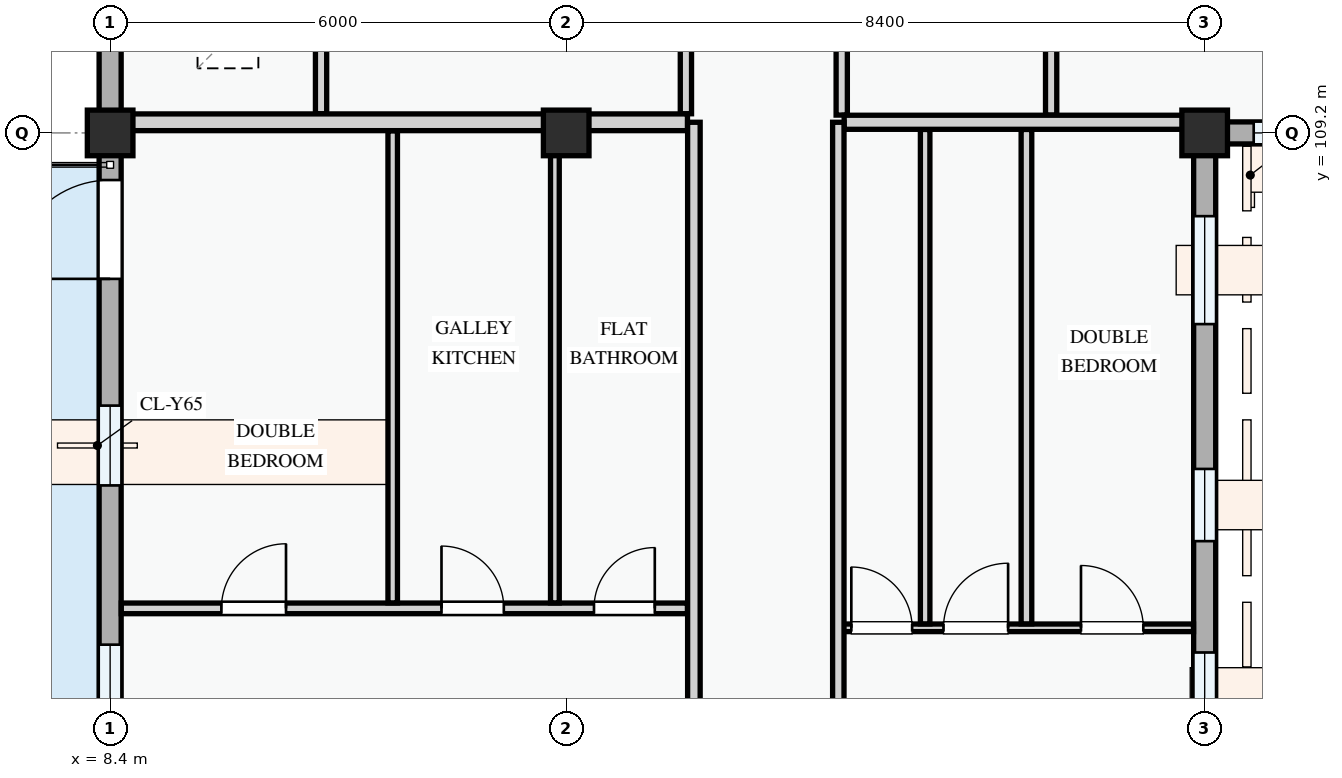
"""IFC4 building model, lengths in metres.
Left out: names, types, materials, properties, quantities, classifications, styles, units other than length and angle.
Written with IfcOpenShell. Run it as: python <this file> out.ifc"""

import sys

from ifc_helpers import new_model, si_unit, direction, frame, frame_2d, origin, origin_2d, place, context, subcontext, project, spatial, rectangle, extrude, element, fill, save


model = new_model("IFC4")
c1 = context("Model", 3, precision=1e-05, world=origin(), true_north=direction((0.0, 1.0)))
c2 = subcontext(c1, "Body", "Model", "MODEL_VIEW")
j1 = project(units=[si_unit("LENGTHUNIT", "METRE"), si_unit("PLANEANGLEUNIT", "RADIAN")], contexts=[c1])
p1 = place(None, origin())
s1 = spatial("IfcSite", under=j1, at=p1, CompositionType="ELEMENT")
p2 = place(p1, origin())
s2 = spatial("IfcBuilding", under=s1, at=p2, CompositionType="ELEMENT")
p3 = place(p2, frame((0.0, 0.0, 27.9)))
s3 = spatial("IfcBuildingStorey", under=s2, at=p3, CompositionType="ELEMENT", Elevation=27.9)
for number, where, z_axis, x_axis in (
    (1, (8.4, 109.2, 0.0), (0.0, 0.0, 1.0), (1.0, 0.0, 0.0)),
    (2, (14.4, 109.2, 0.0), (0.0, 0.0, 1.0), (1.0, 0.0, 0.0)),
    (3, (22.8, 109.2, 0.0), (0.0, 0.0, 1.0), (1.0, 0.0, 0.0)),
):
    element("IfcColumn", number, at=place(p3, frame(where, z_axis=z_axis, x_axis=x_axis)), inside=s3, PredefinedType="COLUMN", context=c2, shape_type="SweptSolid", body=[
        extrude(rectangle(XDim=0.6, YDim=0.6, at=origin_2d()), origin(), (0.0, 0.0, 1.0), 3.3),
    ])
p4 = place(p3, frame((22.8, 109.2, 0.0), z_axis=(0.0, 0.0, 1.0), x_axis=(1.0, 0.0, 0.0)))
e4 = element("IfcWall", 4, at=p4, inside=s3, PredefinedType="STANDARD", context=c2, shape_type="SweptSolid", body=[
    extrude(rectangle(XDim=6.0, YDim=0.29, at=frame_2d((3.0, 0.0))), origin(), (0.0, 0.0, 1.0), 2.475),
])
p5 = place(p4, frame((0.645, 0.0, 0.78)))
e5 = element("IfcOpeningElement", 5, at=p5, cuts=e4, PredefinedType="OPENING", context=c2, shape_type="SweptSolid", body=[
    extrude(rectangle(XDim=1.25, YDim=1.45, at=frame_2d((0.625, 0.725))), frame((0.0, 0.155, 0.0), z_axis=(0.0, -1.0, 0.0), x_axis=(1.0, 0.0, 0.0)), (0.0, 0.0, 1.0), 0.31),
])
p6 = place(p4, frame((2.905, 0.0, 0.78)))
e6 = element("IfcOpeningElement", 6, at=p6, cuts=e4, PredefinedType="OPENING", context=c2, shape_type="SweptSolid", body=[
    extrude(rectangle(XDim=2.35, YDim=1.55, at=frame_2d((1.175, 0.775))), frame((0.0, 0.155, 0.0), z_axis=(0.0, -1.0, 0.0), x_axis=(1.0, 0.0, 0.0)), (0.0, 0.0, 1.0), 0.31),
])
p7 = place(p3, frame((8.4, 115.2, 0.0), z_axis=(0.0, 0.0, 1.0), x_axis=(0.0, -1.0, 0.0)))
e7 = element("IfcWall", 7, at=p7, inside=s3, PredefinedType="STANDARD", context=c2, shape_type="SweptSolid", body=[
    extrude(rectangle(XDim=6.0, YDim=0.29, at=frame_2d((3.0, 0.0))), origin(), (0.0, 0.0, 1.0), 2.445),
])
p8 = place(p7, frame((0.52, 0.0, 0.78)))
e8 = element("IfcOpeningElement", 8, at=p8, cuts=e7, PredefinedType="OPENING", context=c2, shape_type="SweptSolid", body=[
    extrude(rectangle(XDim=0.95, YDim=1.15, at=frame_2d((0.475, 0.575))), frame((0.0, 0.155, 0.0), z_axis=(0.0, -1.0, 0.0), x_axis=(1.0, 0.0, 0.0)), (0.0, 0.0, 1.0), 0.31),
])
p9 = place(p7, frame((2.965, 0.0, 0.78)))
e9 = element("IfcOpeningElement", 9, at=p9, cuts=e7, PredefinedType="OPENING", context=c2, shape_type="SweptSolid", body=[
    extrude(rectangle(XDim=1.68, YDim=1.46, at=frame_2d((0.84, 0.73))), frame((0.0, 0.155, 0.0), z_axis=(0.0, -1.0, 0.0), x_axis=(1.0, 0.0, 0.0)), (0.0, 0.0, 1.0), 0.31),
])
p10 = place(p3, frame((8.4, 109.2, 0.0), z_axis=(0.0, 0.0, 1.0), x_axis=(0.0, -1.0, 0.0)))
e10 = element("IfcWall", 10, at=p10, inside=s3, PredefinedType="STANDARD", context=c2, shape_type="SweptSolid", body=[
    extrude(rectangle(XDim=8.4, YDim=0.29, at=frame_2d((4.2, 0.0))), origin(), (0.0, 0.0, 1.0), 2.345),
])
p11 = place(p10, frame((0.62, 0.0, 0.0)))
e11 = element("IfcOpeningElement", 11, at=p11, cuts=e10, PredefinedType="OPENING", context=c2, shape_type="SweptSolid", body=[
    extrude(rectangle(XDim=1.3, YDim=2.15, at=frame_2d((0.65, 1.075))), frame((0.0, 0.155, 0.0), z_axis=(0.0, -1.0, 0.0), x_axis=(1.0, 0.0, 0.0)), (0.0, 0.0, 1.0), 0.31),
])
p12 = place(p10, frame((3.587, 0.0, 0.78)))
e12 = element("IfcOpeningElement", 12, at=p12, cuts=e10, PredefinedType="OPENING", context=c2, shape_type="SweptSolid", body=[
    extrude(rectangle(XDim=1.05, YDim=1.2, at=frame_2d((0.525, 0.6))), frame((0.0, 0.155, 0.0), z_axis=(0.0, -1.0, 0.0), x_axis=(1.0, 0.0, 0.0)), (0.0, 0.0, 1.0), 0.31),
])
p13 = place(p10, frame((6.732, 0.0, 0.78)))
e13 = element("IfcOpeningElement", 13, at=p13, cuts=e10, PredefinedType="OPENING", context=c2, shape_type="SweptSolid", body=[
    extrude(rectangle(XDim=1.0, YDim=1.25, at=frame_2d((0.5, 0.625))), frame((0.0, 0.155, 0.0), z_axis=(0.0, -1.0, 0.0), x_axis=(1.0, 0.0, 0.0)), (0.0, 0.0, 1.0), 0.31),
])
p14 = place(p3, frame((22.8, 100.8, 0.0), z_axis=(0.0, 0.0, 1.0), x_axis=(0.0, 1.0, 0.0)))
e14 = element("IfcWall", 14, at=p14, inside=s3, PredefinedType="STANDARD", context=c2, shape_type="SweptSolid", body=[
    extrude(rectangle(XDim=8.4, YDim=0.29, at=frame_2d((4.2, 0.0))), origin(), (0.0, 0.0, 1.0), 2.425),
])
p15 = place(p14, frame((0.515, 0.0, 0.78)))
e15 = element("IfcOpeningElement", 15, at=p15, cuts=e14, PredefinedType="OPENING", context=c2, shape_type="SweptSolid", body=[
    extrude(rectangle(XDim=1.05, YDim=1.2, at=frame_2d((0.525, 0.6))), frame((0.0, 0.155, 0.0), z_axis=(0.0, -1.0, 0.0), x_axis=(1.0, 0.0, 0.0)), (0.0, 0.0, 1.0), 0.31),
])
p16 = place(p14, frame((3.029, 0.0, 0.78)))
e16 = element("IfcOpeningElement", 16, at=p16, cuts=e14, PredefinedType="OPENING", context=c2, shape_type="SweptSolid", body=[
    extrude(rectangle(XDim=0.95, YDim=1.15, at=frame_2d((0.475, 0.575))), frame((0.0, 0.155, 0.0), z_axis=(0.0, -1.0, 0.0), x_axis=(1.0, 0.0, 0.0)), (0.0, 0.0, 1.0), 0.31),
])
p17 = place(p14, frame((5.885, 0.0, 0.78)))
e17 = element("IfcOpeningElement", 17, at=p17, cuts=e14, PredefinedType="OPENING", context=c2, shape_type="SweptSolid", body=[
    extrude(rectangle(XDim=1.42, YDim=1.38, at=frame_2d((0.71, 0.69))), frame((0.0, 0.155, 0.0), z_axis=(0.0, -1.0, 0.0), x_axis=(1.0, 0.0, 0.0)), (0.0, 0.0, 1.0), 0.31),
])
for number, where, z_axis, x_axis in (
    (18, (11.175, 113.324, 0.0), (0.0, 0.0, 1.0), (0.0, -1.0, 0.0)),
    (19, (15.975, 113.324, 0.0), (0.0, 0.0, 1.0), (0.0, -1.0, 0.0)),
):
    element("IfcWall", number, at=place(p3, frame(where, z_axis=z_axis, x_axis=x_axis)), inside=s3, PredefinedType="PARTITIONING", context=c2, shape_type="SweptSolid", body=[
        extrude(rectangle(XDim=3.872, YDim=0.148, at=frame_2d((1.936, 0.0))), origin(), (0.0, 0.0, 1.0), 3.0),
    ])
for number, where, z_axis, x_axis in (
    (20, (18.025, 113.324, 0.0), (0.0, 0.0, 1.0), (0.0, -1.0, 0.0)),
    (21, (20.78, 113.324, 0.0), (0.0, 0.0, 1.0), (0.0, -1.0, 0.0)),
):
    element("IfcWall", number, at=place(p3, frame(where, z_axis=z_axis, x_axis=x_axis)), inside=s3, PredefinedType="PARTITIONING", context=c2, shape_type="SweptSolid", body=[
        extrude(rectangle(XDim=3.889, YDim=0.148, at=frame_2d((1.945, 0.0))), origin(), (0.0, 0.0, 1.0), 3.0),
    ])
p18 = place(p3, frame((8.547, 102.945, 0.0), z_axis=(0.0, 0.0, 1.0), x_axis=(1.0, 0.0, 0.0)))
e22 = element("IfcWall", 22, at=p18, inside=s3, PredefinedType="PARTITIONING", context=c2, shape_type="SweptSolid", body=[
    extrude(rectangle(XDim=7.448, YDim=0.14, at=frame_2d((3.724, 0.0))), origin(), (0.0, 0.0, 1.0), 3.0),
])
p19 = place(p18, frame((1.317, 0.0, 0.0)))
e23 = element("IfcOpeningElement", 23, at=p19, cuts=e22, PredefinedType="OPENING", context=c2, shape_type="SweptSolid", body=[
    extrude(rectangle(XDim=0.85, YDim=2.1, at=frame_2d((0.425, 1.05))), frame((0.0, 0.08, 0.0), z_axis=(0.0, -1.0, 0.0), x_axis=(1.0, 0.0, 0.0)), (0.0, 0.0, 1.0), 0.16),
])
p20 = place(p18, frame((4.212, 0.0, 0.0)))
e24 = element("IfcOpeningElement", 24, at=p20, cuts=e22, PredefinedType="OPENING", context=c2, shape_type="SweptSolid", body=[
    extrude(rectangle(XDim=0.82, YDim=2.08, at=frame_2d((0.41, 1.04))), frame((0.0, 0.08, 0.0), z_axis=(0.0, -1.0, 0.0), x_axis=(1.0, 0.0, 0.0)), (0.0, 0.0, 1.0), 0.16),
])
p21 = place(p18, frame((6.219, 0.0, 0.0)))
e25 = element("IfcOpeningElement", 25, at=p21, cuts=e22, PredefinedType="OPENING", context=c2, shape_type="SweptSolid", body=[
    extrude(rectangle(XDim=0.8, YDim=2.1, at=frame_2d((0.4, 1.05))), frame((0.0, 0.08, 0.0), z_axis=(0.0, -1.0, 0.0), x_axis=(1.0, 0.0, 0.0)), (0.0, 0.0, 1.0), 0.16),
])
p22 = place(p3, frame((12.118, 103.017, 0.0), z_axis=(0.0, 0.0, 1.0), x_axis=(0.0, 1.0, 0.0)))
e26 = element("IfcWall", 26, at=p22, inside=s3, PredefinedType="PARTITIONING", context=c2, shape_type="SweptSolid", body=[
    extrude(rectangle(XDim=6.211, YDim=0.125, at=frame_2d((3.105, 0.0))), origin(), (0.0, 0.0, 1.0), 3.0),
])
p23 = place(p3, frame((14.251, 103.017, 0.0), z_axis=(0.0, 0.0, 1.0), x_axis=(0.0, 1.0, 0.0)))
e27 = element("IfcWall", 27, at=p23, inside=s3, PredefinedType="PARTITIONING", context=c2, shape_type="SweptSolid", body=[
    extrude(rectangle(XDim=6.211, YDim=0.115, at=frame_2d((3.105, 0.0))), origin(), (0.0, 0.0, 1.0), 2.425),
])
p24 = place(p3, frame((17.98, 102.689, 0.0), z_axis=(0.0, 0.0, 1.0), x_axis=(1.0, 0.0, 0.0)))
e28 = element("IfcWall", 28, at=p24, inside=s3, PredefinedType="PARTITIONING", context=c2, shape_type="SweptSolid", body=[
    extrude(rectangle(XDim=4.673, YDim=0.1, at=frame_2d((2.336, 0.0))), origin(), (0.0, 0.0, 1.0), 3.0),
])
p25 = place(p24, frame((0.171, 0.0, 0.0)))
e29 = element("IfcOpeningElement", 29, at=p25, cuts=e28, PredefinedType="OPENING", context=c2, shape_type="SweptSolid", body=[
    extrude(rectangle(XDim=0.8, YDim=2.1, at=frame_2d((0.4, 1.05))), frame((0.0, 0.06, 0.0), z_axis=(0.0, -1.0, 0.0), x_axis=(1.0, 0.0, 0.0)), (0.0, 0.0, 1.0), 0.12),
])
p26 = place(p24, frame((1.384, 0.0, 0.0)))
e30 = element("IfcOpeningElement", 30, at=p26, cuts=e28, PredefinedType="OPENING", context=c2, shape_type="SweptSolid", body=[
    extrude(rectangle(XDim=0.85, YDim=2.1, at=frame_2d((0.425, 1.05))), frame((0.0, 0.06, 0.0), z_axis=(0.0, -1.0, 0.0), x_axis=(1.0, 0.0, 0.0)), (0.0, 0.0, 1.0), 0.12),
])
p27 = place(p24, frame((3.193, 0.0, 0.0)))
e31 = element("IfcOpeningElement", 31, at=p27, cuts=e28, PredefinedType="OPENING", context=c2, shape_type="SweptSolid", body=[
    extrude(rectangle(XDim=0.82, YDim=2.08, at=frame_2d((0.41, 1.04))), frame((0.0, 0.06, 0.0), z_axis=(0.0, -1.0, 0.0), x_axis=(1.0, 0.0, 0.0)), (0.0, 0.0, 1.0), 0.12),
])
p28 = place(p3, frame((20.455, 102.741, 0.0), z_axis=(0.0, 0.0, 1.0), x_axis=(0.0, 1.0, 0.0)))
e32 = element("IfcWall", 32, at=p28, inside=s3, PredefinedType="PARTITIONING", context=c2, shape_type="SweptSolid", body=[
    extrude(rectangle(XDim=6.504, YDim=0.14, at=frame_2d((3.252, 0.0))), origin(), (0.0, 0.0, 1.0), 3.0),
])
p29 = place(p3, frame((19.122, 102.741, 0.0), z_axis=(0.0, 0.0, 1.0), x_axis=(0.0, 1.0, 0.0)))
e33 = element("IfcWall", 33, at=p29, inside=s3, PredefinedType="PARTITIONING", context=c2, shape_type="SweptSolid", body=[
    extrude(rectangle(XDim=6.504, YDim=0.125, at=frame_2d((3.252, 0.0))), origin(), (0.0, 0.0, 1.0), 3.0),
])
p30 = place(p3, frame((8.547, 109.34, 0.0), z_axis=(0.0, 0.0, 1.0), x_axis=(1.0, 0.0, 0.0)))
e34 = element("IfcWall", 34, at=p30, inside=s3, PredefinedType="PARTITIONING", context=c2, shape_type="SweptSolid", body=[
    extrude(rectangle(XDim=7.448, YDim=0.22, at=frame_2d((3.724, 0.0))), origin(), (0.0, 0.0, 1.0), 2.375),
])
p31 = place(p3, frame((18.057, 109.34, 0.0), z_axis=(0.0, 0.0, 1.0), x_axis=(1.0, 0.0, 0.0)))
e35 = element("IfcWall", 35, at=p31, inside=s3, PredefinedType="PARTITIONING", context=c2, shape_type="SweptSolid", body=[
    extrude(rectangle(XDim=4.683, YDim=0.185, at=frame_2d((2.342, 0.0))), origin(), (0.0, 0.0, 1.0), 2.375),
])
p32 = place(p3, frame((16.08, 86.547, 0.0), z_axis=(0.0, 0.0, 1.0), x_axis=(0.0, 1.0, 0.0)))
e36 = element("IfcWall", 36, at=p32, inside=s3, PredefinedType="PARTITIONING", context=c2, shape_type="SweptSolid", body=[
    extrude(rectangle(XDim=22.793, YDim=0.165, at=frame_2d((11.396, 0.0))), origin(), (0.0, 0.0, 1.0), 3.0),
])
p33 = place(p32, frame((3.524, 0.0, 0.0)))
e37 = element("IfcOpeningElement", 37, at=p33, cuts=e36, PredefinedType="OPENING", context=c2, shape_type="SweptSolid", body=[
    extrude(rectangle(XDim=0.92, YDim=2.1, at=frame_2d((0.46, 1.05))), frame((0.0, 0.093, 0.0), z_axis=(0.0, -1.0, 0.0), x_axis=(1.0, 0.0, 0.0)), (0.0, 0.0, 1.0), 0.185),
])
p34 = place(p32, frame((10.716, 0.0, 0.0)))
e38 = element("IfcOpeningElement", 38, at=p34, cuts=e36, PredefinedType="OPENING", context=c2, shape_type="SweptSolid", body=[
    extrude(rectangle(XDim=0.92, YDim=2.1, at=frame_2d((0.46, 1.05))), frame((0.0, 0.093, 0.0), z_axis=(0.0, -1.0, 0.0), x_axis=(1.0, 0.0, 0.0)), (0.0, 0.0, 1.0), 0.185),
])
p35 = place(p3, frame((17.98, 86.547, 0.0), z_axis=(0.0, 0.0, 1.0), x_axis=(0.0, 1.0, 0.0)))
e39 = element("IfcWall", 39, at=p35, inside=s3, PredefinedType="PARTITIONING", context=c2, shape_type="SweptSolid", body=[
    extrude(rectangle(XDim=22.793, YDim=0.15, at=frame_2d((11.396, 0.0))), origin(), (0.0, 0.0, 1.0), 3.0),
])
p36 = place(p35, frame((3.546, 0.0, 0.0)))
e40 = element("IfcOpeningElement", 40, at=p36, cuts=e39, PredefinedType="OPENING", context=c2, shape_type="SweptSolid", body=[
    extrude(rectangle(XDim=0.92, YDim=2.1, at=frame_2d((0.46, 1.05))), frame((0.0, 0.085, 0.0), z_axis=(0.0, -1.0, 0.0), x_axis=(1.0, 0.0, 0.0)), (0.0, 0.0, 1.0), 0.17),
])
p37 = place(p35, frame((10.838, 0.0, 0.0)))
e41 = element("IfcOpeningElement", 41, at=p37, cuts=e39, PredefinedType="OPENING", context=c2, shape_type="SweptSolid", body=[
    extrude(rectangle(XDim=0.92, YDim=2.1, at=frame_2d((0.46, 1.05))), frame((0.0, 0.085, 0.0), z_axis=(0.0, -1.0, 0.0), x_axis=(1.0, 0.0, 0.0)), (0.0, 0.0, 1.0), 0.17),
])
p38 = place(p5, origin())
e42 = element("IfcWindow", 42, at=p38, inside=s3, PartitioningType="SINGLE_PANEL", PredefinedType="WINDOW", context=c2, shape_type="SweptSolid", body=[
    extrude(rectangle(XDim=1.25, YDim=1.45, at=frame_2d((0.625, 0.725))), frame((0.0, 0.03, 0.0), z_axis=(0.0, -1.0, 0.0), x_axis=(1.0, 0.0, 0.0)), (0.0, 0.0, 1.0), 0.06),
])
fill(e5, e42)
p39 = place(p11, frame((1.3, 0.0, 0.0), z_axis=(0.0, 0.0, 1.0), x_axis=(-1.0, 0.0, 0.0)))
e43 = element("IfcDoor", 43, at=p39, inside=s3, OperationType="SINGLE_SWING_LEFT", PredefinedType="DOOR", context=c2, shape_type="SweptSolid", body=[
    extrude(rectangle(XDim=1.3, YDim=2.15, at=frame_2d((0.65, 1.075))), frame((0.0, 0.025, 0.0), z_axis=(0.0, -1.0, 0.0), x_axis=(1.0, 0.0, 0.0)), (0.0, 0.0, 1.0), 0.05),
])
fill(e11, e43)
p40 = place(p12, origin())
e44 = element("IfcWindow", 44, at=p40, inside=s3, PartitioningType="SINGLE_PANEL", PredefinedType="WINDOW", context=c2, shape_type="SweptSolid", body=[
    extrude(rectangle(XDim=1.05, YDim=1.2, at=frame_2d((0.525, 0.6))), frame((0.0, 0.03, 0.0), z_axis=(0.0, -1.0, 0.0), x_axis=(1.0, 0.0, 0.0)), (0.0, 0.0, 1.0), 0.06),
])
fill(e12, e44)
p41 = place(p13, origin())
e45 = element("IfcWindow", 45, at=p41, inside=s3, PartitioningType="SINGLE_PANEL", PredefinedType="WINDOW", context=c2, shape_type="SweptSolid", body=[
    extrude(rectangle(XDim=1.0, YDim=1.25, at=frame_2d((0.5, 0.625))), frame((0.0, 0.03, 0.0), z_axis=(0.0, -1.0, 0.0), x_axis=(1.0, 0.0, 0.0)), (0.0, 0.0, 1.0), 0.06),
])
fill(e13, e45)
p42 = place(p15, origin())
e46 = element("IfcWindow", 46, at=p42, inside=s3, PartitioningType="SINGLE_PANEL", PredefinedType="WINDOW", context=c2, shape_type="SweptSolid", body=[
    extrude(rectangle(XDim=1.05, YDim=1.2, at=frame_2d((0.525, 0.6))), frame((0.0, 0.03, 0.0), z_axis=(0.0, -1.0, 0.0), x_axis=(1.0, 0.0, 0.0)), (0.0, 0.0, 1.0), 0.06),
])
fill(e15, e46)
p43 = place(p16, origin())
e47 = element("IfcWindow", 47, at=p43, inside=s3, PartitioningType="SINGLE_PANEL", PredefinedType="WINDOW", context=c2, shape_type="SweptSolid", body=[
    extrude(rectangle(XDim=0.95, YDim=1.15, at=frame_2d((0.475, 0.575))), frame((0.0, 0.03, 0.0), z_axis=(0.0, -1.0, 0.0), x_axis=(1.0, 0.0, 0.0)), (0.0, 0.0, 1.0), 0.06),
])
fill(e16, e47)
p44 = place(p17, origin())
e48 = element("IfcWindow", 48, at=p44, inside=s3, PartitioningType="SINGLE_PANEL", PredefinedType="WINDOW", context=c2, shape_type="SweptSolid", body=[
    extrude(rectangle(XDim=1.42, YDim=1.38, at=frame_2d((0.71, 0.69))), frame((0.0, 0.03, 0.0), z_axis=(0.0, -1.0, 0.0), x_axis=(1.0, 0.0, 0.0)), (0.0, 0.0, 1.0), 0.06),
])
fill(e17, e48)
p45 = place(p19, origin())
e49 = element("IfcDoor", 49, at=p45, inside=s3, OperationType="SINGLE_SWING_RIGHT", PredefinedType="DOOR", context=c2, shape_type="SweptSolid", body=[
    extrude(rectangle(XDim=0.85, YDim=2.1, at=frame_2d((0.425, 1.05))), frame((0.0, 0.025, 0.0), z_axis=(0.0, -1.0, 0.0), x_axis=(1.0, 0.0, 0.0)), (0.0, 0.0, 1.0), 0.05),
])
fill(e23, e49)
p46 = place(p20, origin())
e50 = element("IfcDoor", 50, at=p46, inside=s3, OperationType="SINGLE_SWING_LEFT", PredefinedType="DOOR", context=c2, shape_type="SweptSolid", body=[
    extrude(rectangle(XDim=0.82, YDim=2.08, at=frame_2d((0.41, 1.04))), frame((0.0, 0.025, 0.0), z_axis=(0.0, -1.0, 0.0), x_axis=(1.0, 0.0, 0.0)), (0.0, 0.0, 1.0), 0.05),
])
fill(e24, e50)
p47 = place(p21, origin())
e51 = element("IfcDoor", 51, at=p47, inside=s3, OperationType="SINGLE_SWING_RIGHT", PredefinedType="DOOR", context=c2, shape_type="SweptSolid", body=[
    extrude(rectangle(XDim=0.8, YDim=2.1, at=frame_2d((0.4, 1.05))), frame((0.0, 0.025, 0.0), z_axis=(0.0, -1.0, 0.0), x_axis=(1.0, 0.0, 0.0)), (0.0, 0.0, 1.0), 0.05),
])
fill(e25, e51)
p48 = place(p25, origin())
e52 = element("IfcDoor", 52, at=p48, inside=s3, OperationType="SINGLE_SWING_LEFT", PredefinedType="DOOR", context=c2, shape_type="SweptSolid", body=[
    extrude(rectangle(XDim=0.8, YDim=2.1, at=frame_2d((0.4, 1.05))), frame((0.0, 0.025, 0.0), z_axis=(0.0, -1.0, 0.0), x_axis=(1.0, 0.0, 0.0)), (0.0, 0.0, 1.0), 0.05),
])
fill(e29, e52)
p49 = place(p26, origin())
e53 = element("IfcDoor", 53, at=p49, inside=s3, OperationType="SINGLE_SWING_RIGHT", PredefinedType="DOOR", context=c2, shape_type="SweptSolid", body=[
    extrude(rectangle(XDim=0.85, YDim=2.1, at=frame_2d((0.425, 1.05))), frame((0.0, 0.025, 0.0), z_axis=(0.0, -1.0, 0.0), x_axis=(1.0, 0.0, 0.0)), (0.0, 0.0, 1.0), 0.05),
])
fill(e30, e53)
p50 = place(p27, origin())
e54 = element("IfcDoor", 54, at=p50, inside=s3, OperationType="SINGLE_SWING_LEFT", PredefinedType="DOOR", context=c2, shape_type="SweptSolid", body=[
    extrude(rectangle(XDim=0.82, YDim=2.08, at=frame_2d((0.41, 1.04))), frame((0.0, 0.025, 0.0), z_axis=(0.0, -1.0, 0.0), x_axis=(1.0, 0.0, 0.0)), (0.0, 0.0, 1.0), 0.05),
])
fill(e31, e54)
save(model, sys.argv[1])
